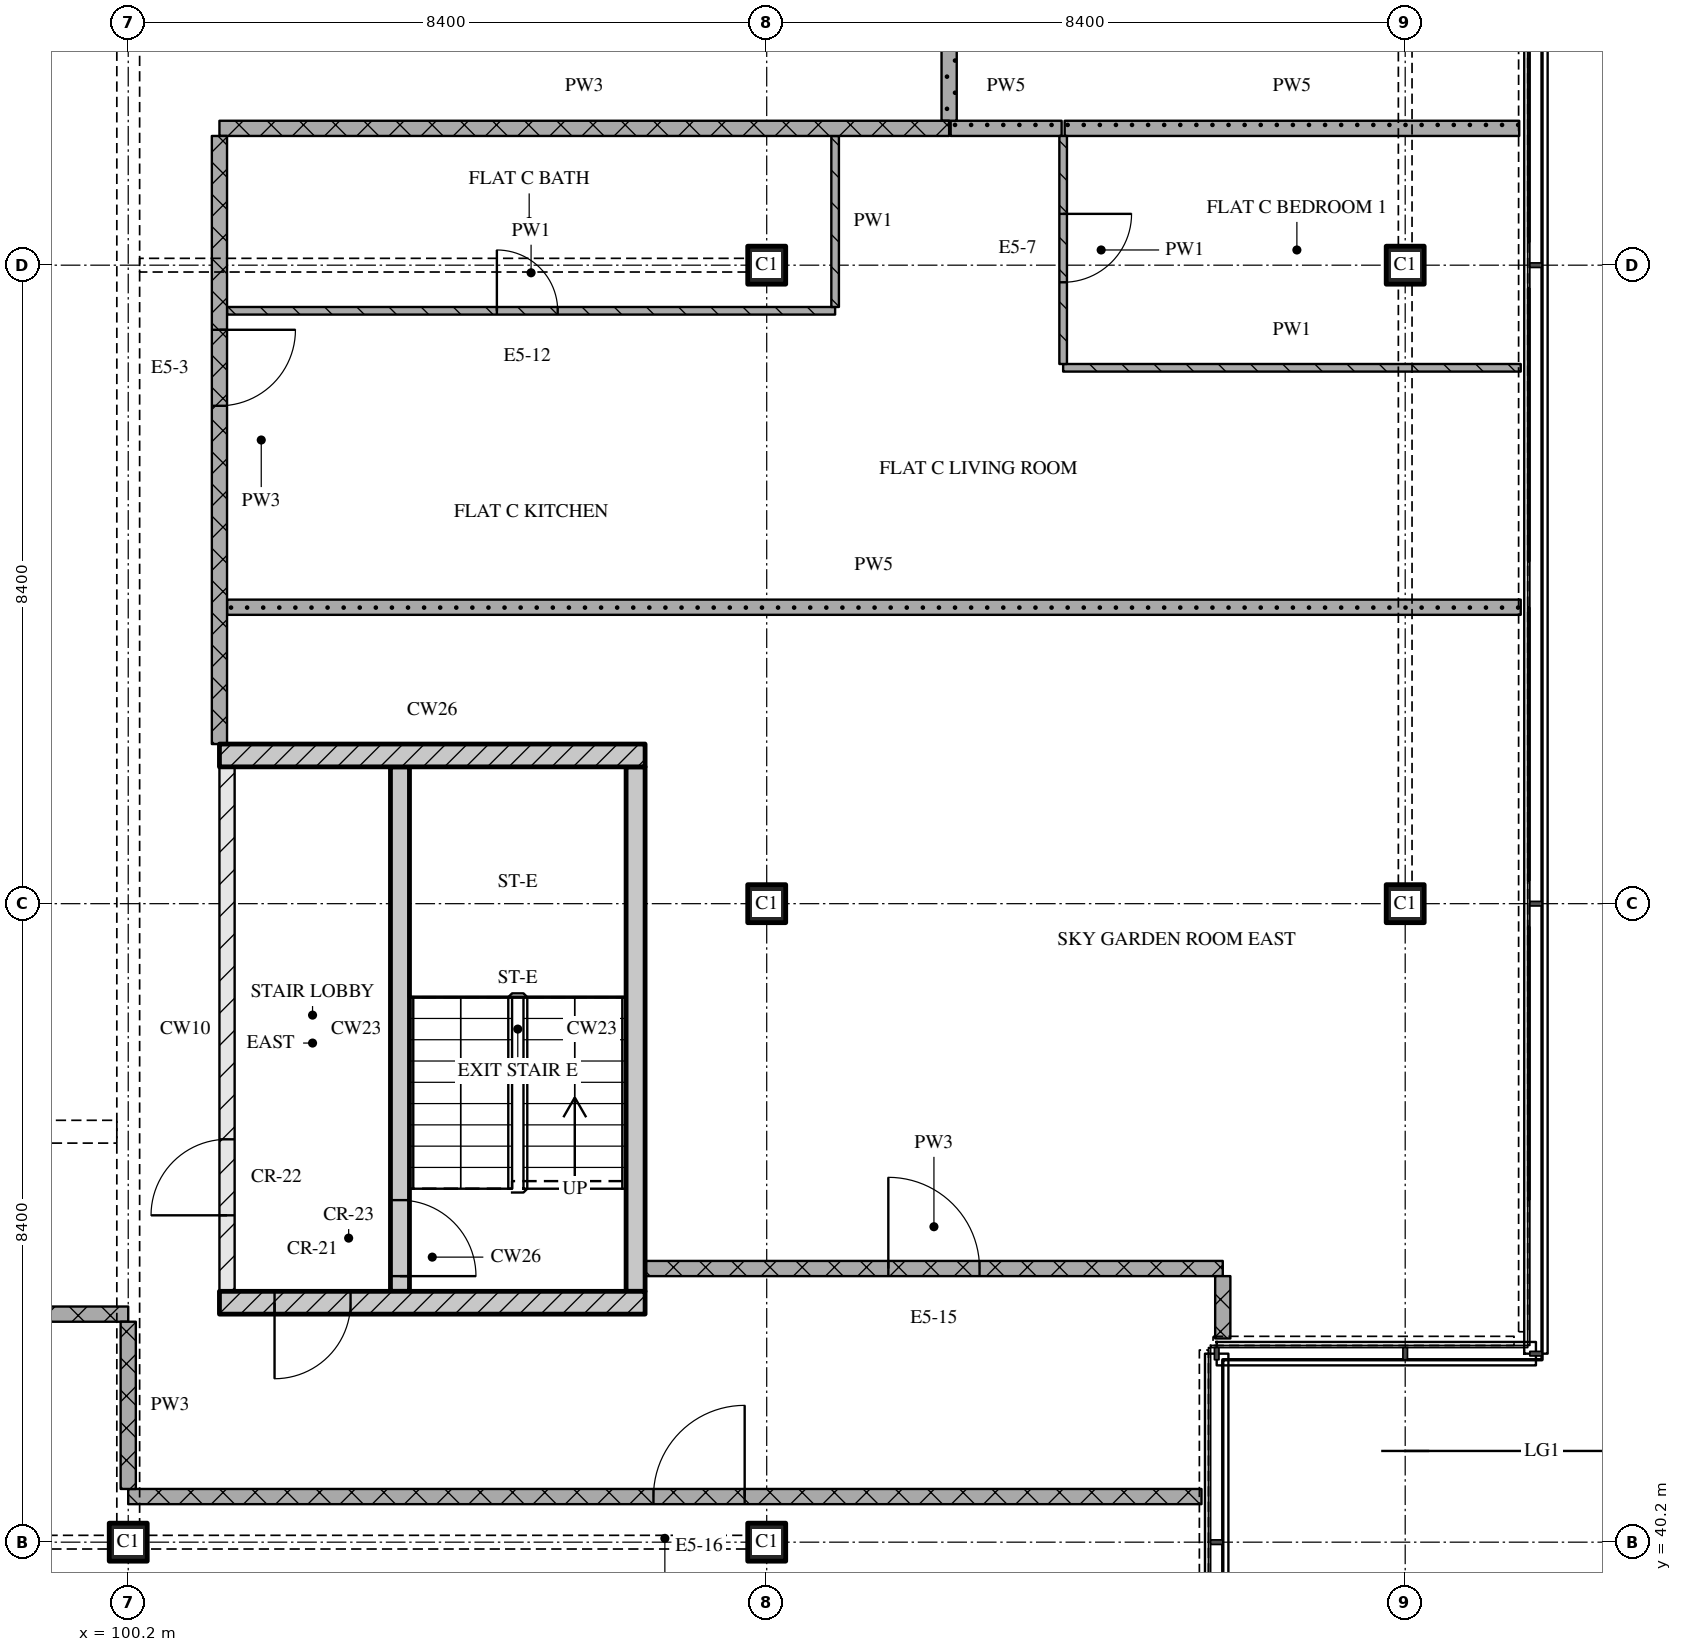
"""IFC4 building model, lengths in metres.
Left out: names, types, materials, properties, quantities, classifications, styles, units other than length and angle.
Written with IfcOpenShell. Run it as: python <this file> out.ifc"""

import sys

from ifc_helpers import new_model, si_unit, direction, frame, frame_2d, origin, origin_2d, place, context, subcontext, project, spatial, rectangle, extrude, element, fill, save


model = new_model("IFC4")
c1 = context("Model", 3, precision=1e-05, world=origin(), true_north=direction((0.0, 1.0)))
c2 = subcontext(c1, "Body", "Model", "MODEL_VIEW")
j1 = project(units=[si_unit("LENGTHUNIT", "METRE"), si_unit("PLANEANGLEUNIT", "RADIAN")], contexts=[c1])
p1 = place(None, origin())
s1 = spatial("IfcSite", under=j1, at=p1, CompositionType="ELEMENT")
p2 = place(p1, origin())
s2 = spatial("IfcBuilding", under=s1, at=p2, CompositionType="ELEMENT")
p3 = place(p2, frame((0.0, 0.0, 292.35)))
s3 = spatial("IfcBuildingStorey", under=s2, at=p3, CompositionType="ELEMENT", Elevation=292.35)
for number, where, z_axis, x_axis in (
    (1, (100.2, 40.2, 0.0), (0.0, 0.0, 1.0), (1.0, 0.0, 0.0)),
    (2, (108.6, 40.2, 0.0), (0.0, 0.0, 1.0), (1.0, 0.0, 0.0)),
    (3, (108.6, 48.6, 0.0), (0.0, 0.0, 1.0), (1.0, 0.0, 0.0)),
    (4, (108.6, 57.0, 0.0), (0.0, 0.0, 1.0), (1.0, 0.0, 0.0)),
    (5, (117.0, 48.6, 0.0), (0.0, 0.0, 1.0), (1.0, 0.0, 0.0)),
    (6, (117.0, 57.0, 0.0), (0.0, 0.0, 1.0), (1.0, 0.0, 0.0)),
):
    element("IfcColumn", number, at=place(p3, frame(where, z_axis=z_axis, x_axis=x_axis)), inside=s3, PredefinedType="COLUMN", context=c2, shape_type="SweptSolid", body=[
        extrude(rectangle(XDim=0.5, YDim=0.5, at=origin_2d()), origin(), (0.0, 0.0, 1.0), 3.6),
    ])
p4 = place(p3, frame((101.4, 43.35, 0.0), z_axis=(0.0, 0.0, 1.0), x_axis=(1.0, 0.0, 0.0)))
e7 = element("IfcWall", 7, at=p4, inside=s3, PredefinedType="SOLIDWALL", context=c2, shape_type="SweptSolid", body=[
    extrude(rectangle(XDim=5.6, YDim=0.3, at=frame_2d((2.8, 0.0))), origin(), (0.0, 0.0, 1.0), 3.32),
])
p5 = place(p4, frame((0.725, 0.0, 0.0)))
e8 = element("IfcOpeningElement", 8, at=p5, cuts=e7, PredefinedType="OPENING", context=c2, shape_type="SweptSolid", body=[
    extrude(rectangle(XDim=1.0, YDim=2.1, at=frame_2d((0.5, 1.05))), frame((0.0, 0.16, 0.0), z_axis=(0.0, -1.0, 0.0), x_axis=(1.0, 0.0, 0.0)), (0.0, 0.0, 1.0), 0.32),
])
p6 = place(p3, frame((101.5, 43.5, 0.0), z_axis=(0.0, 0.0, 1.0), x_axis=(0.0, 1.0, 0.0)))
e9 = element("IfcWall", 9, at=p6, inside=s3, PredefinedType="PARTITIONING", context=c2, shape_type="SweptSolid", body=[
    extrude(rectangle(XDim=6.9, YDim=0.2, at=frame_2d((3.45, 0.0))), origin(), (0.0, 0.0, 1.0), 3.32),
])
p7 = place(p6, frame((1.0, 0.0, 0.0)))
e10 = element("IfcOpeningElement", 10, at=p7, cuts=e9, PredefinedType="OPENING", context=c2, shape_type="SweptSolid", body=[
    extrude(rectangle(XDim=1.0, YDim=2.1, at=frame_2d((0.5, 1.05))), frame((0.0, 0.11, 0.0), z_axis=(0.0, -1.0, 0.0), x_axis=(1.0, 0.0, 0.0)), (0.0, 0.0, 1.0), 0.22),
])
p8 = place(p3, frame((103.775, 43.5, 0.0), z_axis=(0.0, 0.0, 1.0), x_axis=(0.0, 1.0, 0.0)))
e11 = element("IfcWall", 11, at=p8, inside=s3, PredefinedType="SOLIDWALL", context=c2, shape_type="SweptSolid", body=[
    extrude(rectangle(XDim=6.9, YDim=0.25, at=frame_2d((3.45, 0.0))), origin(), (0.0, 0.0, 1.0), 3.32),
])
p9 = place(p8, frame((0.2, 0.0, 0.0)))
e12 = element("IfcOpeningElement", 12, at=p9, cuts=e11, PredefinedType="OPENING", context=c2, shape_type="SweptSolid", body=[
    extrude(rectangle(XDim=1.0, YDim=2.1, at=frame_2d((0.5, 1.05))), frame((0.0, 0.135, 0.0), z_axis=(0.0, -1.0, 0.0), x_axis=(1.0, 0.0, 0.0)), (0.0, 0.0, 1.0), 0.27),
])
p10 = place(p3, frame((106.875, 43.5, 0.0), z_axis=(0.0, 0.0, 1.0), x_axis=(0.0, 1.0, 0.0)))
e13 = element("IfcWall", 13, at=p10, inside=s3, PredefinedType="SOLIDWALL", context=c2, shape_type="SweptSolid", body=[
    extrude(rectangle(XDim=6.9, YDim=0.25, at=frame_2d((3.45, 0.0))), origin(), (0.0, 0.0, 1.0), 3.32),
])
p11 = place(p3, frame((101.4, 50.55, 0.0), z_axis=(0.0, 0.0, 1.0), x_axis=(1.0, 0.0, 0.0)))
e14 = element("IfcWall", 14, at=p11, inside=s3, PredefinedType="SOLIDWALL", context=c2, shape_type="SweptSolid", body=[
    extrude(rectangle(XDim=5.6, YDim=0.3, at=frame_2d((2.8, 0.0))), origin(), (0.0, 0.0, 1.0), 3.32),
])
p12 = place(p3, frame((114.32, 40.8, 0.0), z_axis=(0.0, 0.0, 1.0), x_axis=(-1.0, 0.0, 0.0)))
e15 = element("IfcWall", 15, at=p12, inside=s3, PredefinedType="PARTITIONING", context=c2, shape_type="SweptSolid", body=[
    extrude(rectangle(XDim=14.12, YDim=0.2, at=frame_2d((7.06, 0.0))), origin(), (0.0, 0.0, 1.0), 3.32),
])
p13 = place(p12, frame((6.01, 0.0, 0.0)))
e16 = element("IfcOpeningElement", 16, at=p13, cuts=e15, PredefinedType="OPENING", context=c2, shape_type="SweptSolid", body=[
    extrude(rectangle(XDim=1.2, YDim=2.1, at=frame_2d((0.6, 1.05))), frame((0.0, 0.11, 0.0), z_axis=(0.0, -1.0, 0.0), x_axis=(1.0, 0.0, 0.0)), (0.0, 0.0, 1.0), 0.22),
])
p14 = place(p3, frame((100.2, 43.2, 0.0), z_axis=(0.0, 0.0, 1.0), x_axis=(-1.0, 0.0, 0.0)))
e17 = element("IfcWall", 17, at=p14, inside=s3, PredefinedType="PARTITIONING", context=c2, shape_type="SweptSolid", body=[
    extrude(rectangle(XDim=25.2, YDim=0.2, at=frame_2d((12.6, 0.0))), origin(), (0.0, 0.0, 1.0), 3.32),
])
p15 = place(p14, frame((12.0, 0.0, 0.0)))
e18 = element("IfcOpeningElement", 18, at=p15, cuts=e17, PredefinedType="OPENING", context=c2, shape_type="SweptSolid", body=[
    extrude(rectangle(XDim=1.2, YDim=2.1, at=frame_2d((0.6, 1.05))), frame((0.0, 0.11, 0.0), z_axis=(0.0, -1.0, 0.0), x_axis=(1.0, 0.0, 0.0)), (0.0, 0.0, 1.0), 0.22),
])
p16 = place(p3, frame((107.0, 43.8, 0.0), z_axis=(0.0, 0.0, 1.0), x_axis=(1.0, 0.0, 0.0)))
e19 = element("IfcWall", 19, at=p16, inside=s3, PredefinedType="PARTITIONING", context=c2, shape_type="SweptSolid", body=[
    extrude(rectangle(XDim=7.6, YDim=0.2, at=frame_2d((3.8, 0.0))), origin(), (0.0, 0.0, 1.0), 3.32),
])
p17 = place(p16, frame((3.2, 0.0, 0.0)))
e20 = element("IfcOpeningElement", 20, at=p17, cuts=e19, PredefinedType="OPENING", context=c2, shape_type="SweptSolid", body=[
    extrude(rectangle(XDim=1.2, YDim=2.1, at=frame_2d((0.6, 1.05))), frame((0.0, 0.11, 0.0), z_axis=(0.0, -1.0, 0.0), x_axis=(1.0, 0.0, 0.0)), (0.0, 0.0, 1.0), 0.22),
])
p18 = place(p3, frame((101.5, 52.5, 0.0), z_axis=(0.0, 0.0, 1.0), x_axis=(1.0, 0.0, 0.0)))
e21 = element("IfcWall", 21, at=p18, inside=s3, PredefinedType="PARTITIONING", context=c2, shape_type="SweptSolid", body=[
    extrude(rectangle(XDim=17.02, YDim=0.2, at=frame_2d((8.51, 0.0))), origin(), (0.0, 0.0, 1.0), 3.32),
])
p19 = place(p3, frame((112.5, 55.65, 0.0), z_axis=(0.0, 0.0, 1.0), x_axis=(1.0, 0.0, 0.0)))
e22 = element("IfcWall", 22, at=p19, inside=s3, PredefinedType="PARTITIONING", context=c2, shape_type="SweptSolid", body=[
    extrude(rectangle(XDim=6.02, YDim=0.1, at=frame_2d((3.01, 0.0))), origin(), (0.0, 0.0, 1.0), 3.32),
])
p20 = place(p3, frame((101.5, 56.4, 0.0), z_axis=(0.0, 0.0, 1.0), x_axis=(1.0, 0.0, 0.0)))
e23 = element("IfcWall", 23, at=p20, inside=s3, PredefinedType="PARTITIONING", context=c2, shape_type="SweptSolid", body=[
    extrude(rectangle(XDim=8.0, YDim=0.1, at=frame_2d((4.0, 0.0))), origin(), (0.0, 0.0, 1.0), 3.32),
])
p21 = place(p20, frame((3.55, 0.0, 0.0)))
e24 = element("IfcOpeningElement", 24, at=p21, cuts=e23, PredefinedType="OPENING", context=c2, shape_type="SweptSolid", body=[
    extrude(rectangle(XDim=0.8, YDim=2.1, at=frame_2d((0.4, 1.05))), frame((0.0, 0.06, 0.0), z_axis=(0.0, -1.0, 0.0), x_axis=(1.0, 0.0, 0.0)), (0.0, 0.0, 1.0), 0.12),
])
p22 = place(p3, frame((101.4, 58.8, 0.0), z_axis=(0.0, 0.0, 1.0), x_axis=(1.0, 0.0, 0.0)))
e25 = element("IfcWall", 25, at=p22, inside=s3, PredefinedType="PARTITIONING", context=c2, shape_type="SweptSolid", body=[
    extrude(rectangle(XDim=9.6, YDim=0.2, at=frame_2d((4.8, 0.0))), origin(), (0.0, 0.0, 1.0), 3.32),
])
p23 = place(p3, frame((111.02, 58.8, 0.0), z_axis=(0.0, 0.0, 1.0), x_axis=(1.0, 0.0, 0.0)))
e26 = element("IfcWall", 26, at=p23, inside=s3, PredefinedType="PARTITIONING", context=c2, shape_type="SweptSolid", body=[
    extrude(rectangle(XDim=1.46, YDim=0.2, at=frame_2d((0.73, 0.0))), origin(), (0.0, 0.0, 1.0), 3.32),
])
p24 = place(p3, frame((112.52, 58.8, 0.0), z_axis=(0.0, 0.0, 1.0), x_axis=(1.0, 0.0, 0.0)))
e27 = element("IfcWall", 27, at=p24, inside=s3, PredefinedType="PARTITIONING", context=c2, shape_type="SweptSolid", body=[
    extrude(rectangle(XDim=5.98, YDim=0.2, at=frame_2d((2.99, 0.0))), origin(), (0.0, 0.0, 1.0), 3.32),
])
p25 = place(p3, frame((100.2, 43.1, 0.0), z_axis=(0.0, 0.0, 1.0), x_axis=(0.0, -1.0, 0.0)))
e28 = element("IfcWall", 28, at=p25, inside=s3, PredefinedType="PARTITIONING", context=c2, shape_type="SweptSolid", body=[
    extrude(rectangle(XDim=2.2, YDim=0.2, at=frame_2d((1.1, 0.0))), origin(), (0.0, 0.0, 1.0), 2.53),
])
p26 = place(p3, frame((101.4, 58.7, 0.0), z_axis=(0.0, 0.0, 1.0), x_axis=(0.0, -1.0, 0.0)))
e29 = element("IfcWall", 29, at=p26, inside=s3, PredefinedType="PARTITIONING", context=c2, shape_type="SweptSolid", body=[
    extrude(rectangle(XDim=8.0, YDim=0.2, at=frame_2d((4.0, 0.0))), origin(), (0.0, 0.0, 1.0), 3.32),
])
p27 = place(p26, frame((2.55, 0.0, 0.0)))
e30 = element("IfcOpeningElement", 30, at=p27, cuts=e29, PredefinedType="OPENING", context=c2, shape_type="SweptSolid", body=[
    extrude(rectangle(XDim=1.0, YDim=2.1, at=frame_2d((0.5, 1.05))), frame((0.0, 0.11, 0.0), z_axis=(0.0, -1.0, 0.0), x_axis=(1.0, 0.0, 0.0)), (0.0, 0.0, 1.0), 0.22),
])
p28 = place(p3, frame((109.5, 58.7, 0.0), z_axis=(0.0, 0.0, 1.0), x_axis=(0.0, -1.0, 0.0)))
e31 = element("IfcWall", 31, at=p28, inside=s3, PredefinedType="PARTITIONING", context=c2, shape_type="SweptSolid", body=[
    extrude(rectangle(XDim=2.25, YDim=0.1, at=frame_2d((1.125, 0.0))), origin(), (0.0, 0.0, 1.0), 3.32),
])
p29 = place(p3, frame((111.0, 61.1, 0.0), z_axis=(0.0, 0.0, 1.0), x_axis=(0.0, -1.0, 0.0)))
e32 = element("IfcWall", 32, at=p29, inside=s3, PredefinedType="PARTITIONING", context=c2, shape_type="SweptSolid", body=[
    extrude(rectangle(XDim=2.2, YDim=0.2, at=frame_2d((1.1, 0.0))), origin(), (0.0, 0.0, 1.0), 3.32),
])
p30 = place(p3, frame((112.5, 58.7, 0.0), z_axis=(0.0, 0.0, 1.0), x_axis=(0.0, -1.0, 0.0)))
e33 = element("IfcWall", 33, at=p30, inside=s3, PredefinedType="PARTITIONING", context=c2, shape_type="SweptSolid", body=[
    extrude(rectangle(XDim=3.0, YDim=0.1, at=frame_2d((1.5, 0.0))), origin(), (0.0, 0.0, 1.0), 3.32),
])
p31 = place(p30, frame((1.025, 0.0, 0.0)))
e34 = element("IfcOpeningElement", 34, at=p31, cuts=e33, PredefinedType="OPENING", context=c2, shape_type="SweptSolid", body=[
    extrude(rectangle(XDim=0.9, YDim=2.1, at=frame_2d((0.45, 1.05))), frame((0.0, 0.06, 0.0), z_axis=(0.0, -1.0, 0.0), x_axis=(1.0, 0.0, 0.0)), (0.0, 0.0, 1.0), 0.12),
])
p32 = place(p3, frame((114.6, 43.7, 0.0), z_axis=(0.0, 0.0, 1.0), x_axis=(0.0, -1.0, 0.0)))
e35 = element("IfcWall", 35, at=p32, inside=s3, PredefinedType="PARTITIONING", context=c2, shape_type="SweptSolid", body=[
    extrude(rectangle(XDim=0.82, YDim=0.2, at=frame_2d((0.41, 0.0))), origin(), (0.0, 0.0, 1.0), 3.32),
])
p33 = place(p5, origin())
e36 = element("IfcDoor", 36, at=p33, inside=s3, OperationType="SINGLE_SWING_RIGHT", PredefinedType="DOOR", context=c2, shape_type="SweptSolid", body=[
    extrude(rectangle(XDim=1.0, YDim=2.1, at=frame_2d((0.5, 1.05))), frame((0.0, 0.025, 0.0), z_axis=(0.0, -1.0, 0.0), x_axis=(1.0, 0.0, 0.0)), (0.0, 0.0, 1.0), 0.05),
])
fill(e8, e36)
p34 = place(p9, origin())
e37 = element("IfcDoor", 37, at=p34, inside=s3, OperationType="SINGLE_SWING_RIGHT", PredefinedType="DOOR", context=c2, shape_type="SweptSolid", body=[
    extrude(rectangle(XDim=1.0, YDim=2.1, at=frame_2d((0.5, 1.05))), frame((0.0, 0.025, 0.0), z_axis=(0.0, -1.0, 0.0), x_axis=(1.0, 0.0, 0.0)), (0.0, 0.0, 1.0), 0.05),
])
fill(e12, e37)
p35 = place(p7, origin())
e38 = element("IfcDoor", 38, at=p35, inside=s3, OperationType="SINGLE_SWING_LEFT", PredefinedType="DOOR", context=c2, shape_type="SweptSolid", body=[
    extrude(rectangle(XDim=1.0, YDim=2.1, at=frame_2d((0.5, 1.05))), frame((0.0, 0.025, 0.0), z_axis=(0.0, -1.0, 0.0), x_axis=(1.0, 0.0, 0.0)), (0.0, 0.0, 1.0), 0.05),
])
fill(e10, e38)
p36 = place(p13, origin())
e39 = element("IfcDoor", 39, at=p36, inside=s3, OperationType="SINGLE_SWING_RIGHT", PredefinedType="DOOR", context=c2, shape_type="SweptSolid", body=[
    extrude(rectangle(XDim=1.2, YDim=2.1, at=frame_2d((0.6, 1.05))), frame((0.0, 0.025, 0.0), z_axis=(0.0, -1.0, 0.0), x_axis=(1.0, 0.0, 0.0)), (0.0, 0.0, 1.0), 0.05),
])
fill(e16, e39)
p37 = place(p17, origin())
e40 = element("IfcDoor", 40, at=p37, inside=s3, OperationType="SINGLE_SWING_LEFT", PredefinedType="DOOR", context=c2, shape_type="SweptSolid", body=[
    extrude(rectangle(XDim=1.2, YDim=2.1, at=frame_2d((0.6, 1.05))), frame((0.0, 0.025, 0.0), z_axis=(0.0, -1.0, 0.0), x_axis=(1.0, 0.0, 0.0)), (0.0, 0.0, 1.0), 0.05),
])
fill(e20, e40)
p38 = place(p21, origin())
e41 = element("IfcDoor", 41, at=p38, inside=s3, OperationType="SINGLE_SWING_LEFT", PredefinedType="DOOR", context=c2, shape_type="SweptSolid", body=[
    extrude(rectangle(XDim=0.8, YDim=2.1, at=frame_2d((0.4, 1.05))), frame((0.0, 0.025, 0.0), z_axis=(0.0, -1.0, 0.0), x_axis=(1.0, 0.0, 0.0)), (0.0, 0.0, 1.0), 0.05),
])
fill(e24, e41)
p39 = place(p27, origin())
e42 = element("IfcDoor", 42, at=p39, inside=s3, OperationType="SINGLE_SWING_LEFT", PredefinedType="DOOR", context=c2, shape_type="SweptSolid", body=[
    extrude(rectangle(XDim=1.0, YDim=2.1, at=frame_2d((0.5, 1.05))), frame((0.0, 0.025, 0.0), z_axis=(0.0, -1.0, 0.0), x_axis=(1.0, 0.0, 0.0)), (0.0, 0.0, 1.0), 0.05),
])
fill(e30, e42)
p40 = place(p31, origin())
e43 = element("IfcDoor", 43, at=p40, inside=s3, OperationType="SINGLE_SWING_LEFT", PredefinedType="DOOR", context=c2, shape_type="SweptSolid", body=[
    extrude(rectangle(XDim=0.9, YDim=2.1, at=frame_2d((0.45, 1.05))), frame((0.0, 0.025, 0.0), z_axis=(0.0, -1.0, 0.0), x_axis=(1.0, 0.0, 0.0)), (0.0, 0.0, 1.0), 0.05),
])
fill(e34, e43)
save(model, sys.argv[1])
